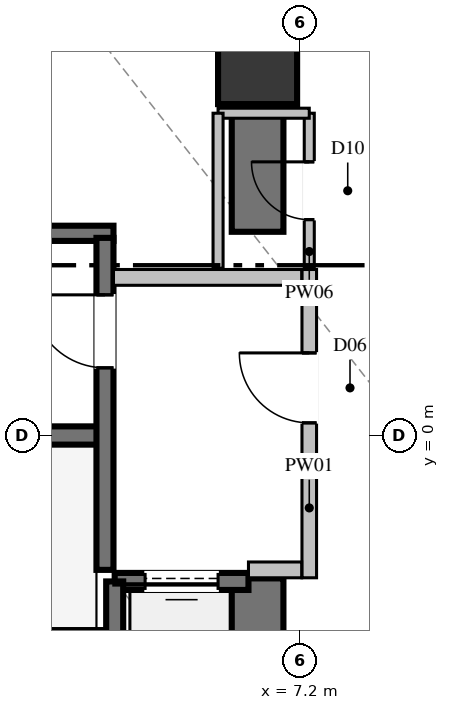
"""IFC4 building model, lengths in metres.
Left out: names, types, materials, properties, quantities, classifications, styles, units other than length and angle.
Written with IfcOpenShell. Run it as: python <this file> out.ifc"""

import sys

from ifc_helpers import new_model, si_unit, direction, frame, frame_2d, origin, origin_2d, place, context, subcontext, project, spatial, rectangle, extrude, element, fill, save


model = new_model("IFC4")
c1 = context("Model", 3, precision=1e-05, world=origin(), true_north=direction((0.0, 1.0)))
c2 = subcontext(c1, "Body", "Model", "MODEL_VIEW")
j1 = project(units=[si_unit("LENGTHUNIT", "METRE"), si_unit("PLANEANGLEUNIT", "RADIAN")], contexts=[c1])
p1 = place(None, origin())
s1 = spatial("IfcSite", under=j1, at=p1, CompositionType="ELEMENT")
p2 = place(p1, origin())
s2 = spatial("IfcBuilding", under=s1, at=p2, CompositionType="ELEMENT")
p3 = place(p2, frame((0.0, 0.0, -9.6)))
s3 = spatial("IfcBuildingStorey", under=s2, at=p3, CompositionType="ELEMENT", Elevation=-9.6)
p4 = place(p3, frame((6.5, 6.1, 0.0), z_axis=(0.0, 0.0, 1.0), x_axis=(1.0, 0.0, 0.0)))
e1 = element("IfcColumn", 1, at=p4, inside=s3, PredefinedType="COLUMN", context=c2, shape_type="SweptSolid", body=[
    extrude(rectangle(XDim=1.3, YDim=1.3, at=origin_2d()), origin(), (0.0, 0.0, 1.0), 4.8),
])
p5 = place(p3, frame((-3.99, 0.0, 0.0), z_axis=(0.0, 0.0, 1.0), x_axis=(1.0, 0.0, 0.0)))
e2 = element("IfcWall", 2, at=p5, inside=s3, PredefinedType="SHEAR", context=c2, shape_type="SweptSolid", body=[
    extrude(rectangle(XDim=7.98, YDim=0.3, at=frame_2d((3.99, 0.0))), origin(), (0.0, 0.0, 1.0), 4.8),
])
for number, where, z_axis, x_axis in (
    (3, (-4.13, -3.325, 0.0), (0.0, 0.0, 1.0), (1.0, 0.0, 0.0)),
    (4, (-4.13, 3.325, 0.0), (0.0, 0.0, 1.0), (1.0, 0.0, 0.0)),
):
    element("IfcWall", number, at=place(p3, frame(where, z_axis=z_axis, x_axis=x_axis)), inside=s3, PredefinedType="SOLIDWALL", context=c2, shape_type="SweptSolid", body=[
        extrude(rectangle(XDim=8.26, YDim=0.25, at=frame_2d((4.13, 0.0))), origin(), (0.0, 0.0, 1.0), 4.8),
    ])
p6 = place(p3, frame((5.85, 6.1, 0.0), z_axis=(0.0, 0.0, 1.0), x_axis=(1.0, 0.0, 0.0)))
e5 = element("IfcWall", 5, at=p6, inside=s3, PredefinedType="SHEAR", context=c2, shape_type="SweptSolid", body=[
    extrude(rectangle(XDim=0.225, YDim=0.85, at=frame_2d((0.112, 0.0))), origin(), (0.0, 0.0, 1.0), 4.8),
])
p7 = place(p3, frame((6.5, -6.525, 0.0), z_axis=(0.0, 0.0, 1.0), x_axis=(0.0, 1.0, 0.0)))
e6 = element("IfcWall", 6, at=p7, inside=s3, PredefinedType="SHEAR", context=c2, shape_type="SweptSolid", body=[
    extrude(rectangle(XDim=4.175, YDim=0.85, at=frame_2d((2.087, 0.0))), origin(), (0.0, 0.0, 1.0), 4.8),
])
p8 = place(p3, frame((6.5, 3.35, 0.0), z_axis=(0.0, 0.0, 1.0), x_axis=(0.0, 1.0, 0.0)))
e7 = element("IfcWall", 7, at=p8, inside=s3, PredefinedType="SHEAR", context=c2, shape_type="SweptSolid", body=[
    extrude(rectangle(XDim=3.175, YDim=0.85, at=frame_2d((1.587, 0.0))), origin(), (0.0, 0.0, 1.0), 4.8),
])
p9 = place(p3, frame((6.35, -2.4, 0.0), z_axis=(0.0, 0.0, 1.0), x_axis=(-1.0, 0.0, 0.0)))
e8 = element("IfcWall", 8, at=p9, inside=s3, PredefinedType="SOLIDWALL", context=c2, shape_type="SweptSolid", body=[
    extrude(rectangle(XDim=2.2, YDim=0.28, at=frame_2d((1.1, 0.0))), origin(), (0.0, 0.0, 1.0), 4.46),
])
p10 = place(p9, frame((0.5, 0.0, 0.0)))
e9 = element("IfcOpeningElement", 9, at=p10, cuts=e8, PredefinedType="OPENING", context=c2, shape_type="SweptSolid", body=[
    extrude(rectangle(XDim=1.2, YDim=2.2, at=frame_2d((0.6, 1.1))), frame((0.0, 0.15, 0.0), z_axis=(0.0, -1.0, 0.0), x_axis=(1.0, 0.0, 0.0)), (0.0, 0.0, 1.0), 0.3),
])
p11 = place(p3, frame((4.15, -2.4, 0.0), z_axis=(0.0, 0.0, 1.0), x_axis=(0.0, -1.0, 0.0)))
e10 = element("IfcWall", 10, at=p11, inside=s3, PredefinedType="SOLIDWALL", context=c2, shape_type="SweptSolid", body=[
    extrude(rectangle(XDim=2.7, YDim=0.28, at=frame_2d((1.35, 0.0))), origin(), (0.0, 0.0, 1.0), 4.46),
])
p12 = place(p3, frame((3.99, -2.21, 0.0), z_axis=(0.0, 0.0, 1.0), x_axis=(0.0, 1.0, 0.0)))
e11 = element("IfcWall", 11, at=p12, inside=s3, PredefinedType="SOLIDWALL", context=c2, shape_type="SweptSolid", body=[
    extrude(rectangle(XDim=5.46, YDim=0.28, at=frame_2d((2.73, 0.0))), origin(), (0.0, 0.0, 1.0), 4.46),
])
p13 = place(p12, frame((3.323, 0.0, 0.0)))
e12 = element("IfcOpeningElement", 12, at=p13, cuts=e11, PredefinedType="OPENING", context=c2, shape_type="SweptSolid", body=[
    extrude(rectangle(XDim=1.2, YDim=2.2, at=frame_2d((0.6, 1.1))), frame((0.0, 0.15, 0.0), z_axis=(0.0, -1.0, 0.0), x_axis=(1.0, 0.0, 0.0)), (0.0, 0.0, 1.0), 0.3),
])
p14 = place(p3, frame((7.35, -2.34, 0.0), z_axis=(0.0, 0.0, 1.0), x_axis=(0.0, 1.0, 0.0)))
e13 = element("IfcWall", 13, at=p14, inside=s3, PredefinedType="PARTITIONING", context=c2, shape_type="SweptSolid", body=[
    extrude(rectangle(XDim=5.07, YDim=0.24, at=frame_2d((2.535, 0.0))), origin(), (0.0, 0.0, 1.0), 3.345),
])
p15 = place(p14, frame((2.548, 0.0, 0.0)))
e14 = element("IfcOpeningElement", 14, at=p15, cuts=e13, PredefinedType="OPENING", context=c2, shape_type="SweptSolid", body=[
    extrude(rectangle(XDim=1.15, YDim=2.2, at=frame_2d((0.575, 1.1))), frame((0.0, 0.13, 0.0), z_axis=(0.0, -1.0, 0.0), x_axis=(1.0, 0.0, 0.0)), (0.0, 0.0, 1.0), 0.26),
])
p16 = place(p3, frame((6.35, -2.21, 0.0), z_axis=(0.0, 0.0, 1.0), x_axis=(1.0, 0.0, 0.0)))
e15 = element("IfcWall", 15, at=p16, inside=s3, PredefinedType="PARTITIONING", context=c2, shape_type="SweptSolid", body=[
    extrude(rectangle(XDim=0.875, YDim=0.26, at=frame_2d((0.438, 0.0))), origin(), (0.0, 0.0, 1.0), 4.46),
])
p17 = place(p3, frame((4.13, 2.6, 0.0), z_axis=(0.0, 0.0, 1.0), x_axis=(1.0, 0.0, 0.0)))
e16 = element("IfcWall", 16, at=p17, inside=s3, PredefinedType="PARTITIONING", context=c2, shape_type="SweptSolid", body=[
    extrude(rectangle(XDim=3.095, YDim=0.26, at=frame_2d((1.548, 0.0))), origin(), (0.0, 0.0, 1.0), 4.46),
])
p18 = place(p3, frame((7.35, 2.75, 0.0), z_axis=(0.0, 0.0, 1.0), x_axis=(0.0, 1.0, 0.0)))
e17 = element("IfcWall", 17, at=p18, inside=s3, PredefinedType="PARTITIONING", context=c2, shape_type="SweptSolid", body=[
    extrude(rectangle(XDim=2.55, YDim=0.165, at=frame_2d((1.275, 0.0))), origin(), (0.0, 0.0, 1.0), 3.345),
])
p19 = place(p18, frame((0.8, 0.0, 0.0)))
e18 = element("IfcOpeningElement", 18, at=p19, cuts=e17, PredefinedType="OPENING", context=c2, shape_type="SweptSolid", body=[
    extrude(rectangle(XDim=0.95, YDim=2.1, at=frame_2d((0.475, 1.05))), frame((0.0, 0.093, 0.0), z_axis=(0.0, -1.0, 0.0), x_axis=(1.0, 0.0, 0.0)), (0.0, 0.0, 1.0), 0.185),
])
p20 = place(p3, frame((7.35, 5.3, 0.0), z_axis=(0.0, 0.0, 1.0), x_axis=(-1.0, 0.0, 0.0)))
e19 = element("IfcWall", 19, at=p20, inside=s3, PredefinedType="PARTITIONING", context=c2, shape_type="SweptSolid", body=[
    extrude(rectangle(XDim=1.5, YDim=0.165, at=frame_2d((0.75, 0.0))), origin(), (0.0, 0.0, 1.0), 3.345),
])
p21 = place(p3, frame((5.85, 5.3, 0.0), z_axis=(0.0, 0.0, 1.0), x_axis=(0.0, -1.0, 0.0)))
e20 = element("IfcWall", 20, at=p21, inside=s3, PredefinedType="PARTITIONING", context=c2, shape_type="SweptSolid", body=[
    extrude(rectangle(XDim=2.55, YDim=0.165, at=frame_2d((1.275, 0.0))), origin(), (0.0, 0.0, 1.0), 3.345),
])
p22 = place(p10, origin())
e21 = element("IfcDoor", 21, at=p22, inside=s3, OperationType="SLIDING_TO_LEFT", PredefinedType="DOOR", context=c2, shape_type="SweptSolid", body=[
    extrude(rectangle(XDim=1.2, YDim=2.2, at=frame_2d((0.6, 1.1))), frame((0.0, 0.025, 0.0), z_axis=(0.0, -1.0, 0.0), x_axis=(1.0, 0.0, 0.0)), (0.0, 0.0, 1.0), 0.05),
])
fill(e9, e21)
p23 = place(p13, origin())
e22 = element("IfcDoor", 22, at=p23, inside=s3, OperationType="SINGLE_SWING_RIGHT", PredefinedType="DOOR", context=c2, shape_type="SweptSolid", body=[
    extrude(rectangle(XDim=1.2, YDim=2.2, at=frame_2d((0.6, 1.1))), frame((0.0, 0.025, 0.0), z_axis=(0.0, -1.0, 0.0), x_axis=(1.0, 0.0, 0.0)), (0.0, 0.0, 1.0), 0.05),
])
fill(e12, e22)
p24 = place(p15, origin())
e23 = element("IfcDoor", 23, at=p24, inside=s3, OperationType="SINGLE_SWING_RIGHT", PredefinedType="DOOR", context=c2, shape_type="SweptSolid", body=[
    extrude(rectangle(XDim=1.15, YDim=2.2, at=frame_2d((0.575, 1.1))), frame((0.0, 0.025, 0.0), z_axis=(0.0, -1.0, 0.0), x_axis=(1.0, 0.0, 0.0)), (0.0, 0.0, 1.0), 0.05),
])
fill(e14, e23)
p25 = place(p19, origin())
e24 = element("IfcDoor", 24, at=p25, inside=s3, OperationType="SINGLE_SWING_RIGHT", PredefinedType="DOOR", context=c2, shape_type="SweptSolid", body=[
    extrude(rectangle(XDim=0.95, YDim=2.1, at=frame_2d((0.475, 1.05))), frame((0.0, 0.025, 0.0), z_axis=(0.0, -1.0, 0.0), x_axis=(1.0, 0.0, 0.0)), (0.0, 0.0, 1.0), 0.05),
])
fill(e18, e24)
save(model, sys.argv[1])
